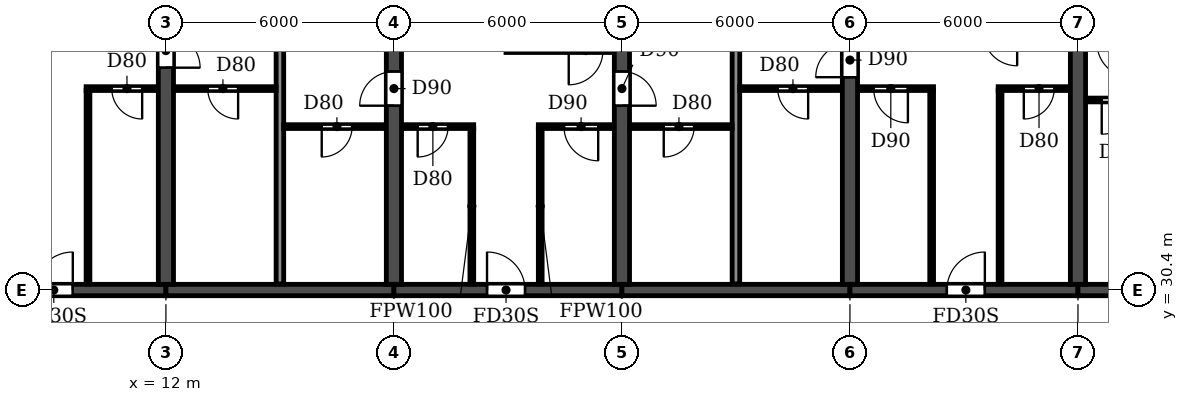
"""IFC4 building model, lengths in metres.
Left out: names, types, materials, properties, quantities, classifications, styles, units other than length and angle.
Written with IfcOpenShell. Run it as: python <this file> out.ifc"""

import sys

from ifc_helpers import new_model, si_unit, direction, frame, frame_2d, origin, place, context, subcontext, project, spatial, rectangle, extrude, element, fill, save


model = new_model("IFC4")
c1 = context("Model", 3, precision=1e-05, world=origin(), true_north=direction((0.0, 1.0)))
c2 = subcontext(c1, "Body", "Model", "MODEL_VIEW")
j1 = project(units=[si_unit("LENGTHUNIT", "METRE"), si_unit("PLANEANGLEUNIT", "RADIAN")], contexts=[c1])
p1 = place(None, origin())
s1 = spatial("IfcSite", under=j1, at=p1, CompositionType="ELEMENT")
p2 = place(p1, origin())
s2 = spatial("IfcBuilding", under=s1, at=p2, CompositionType="ELEMENT")
p3 = place(p2, frame((0.0, 0.0, 26.7)))
s3 = spatial("IfcBuildingStorey", under=s2, at=p3, CompositionType="ELEMENT", Elevation=26.7)
p4 = place(p3, frame((12.0, 30.55, 0.0), z_axis=(0.0, 0.0, 1.0), x_axis=(0.0, 1.0, 0.0)))
e1 = element("IfcWall", 1, at=p4, inside=s3, PredefinedType="SHEAR", context=c2, shape_type="SweptSolid", body=[
    extrude(rectangle(XDim=14.05, YDim=0.4, at=frame_2d((7.025, 0.0))), origin(), (0.0, 0.0, 1.0), 3.05),
])
p5 = place(p4, frame((5.7, 0.0, 0.0)))
e2 = element("IfcOpeningElement", 2, at=p5, cuts=e1, PredefinedType="OPENING", context=c2, shape_type="SweptSolid", body=[
    extrude(rectangle(XDim=0.9, YDim=2.1, at=frame_2d((0.45, 1.05))), frame((0.0, 0.21, 0.0), z_axis=(0.0, -1.0, 0.0), x_axis=(1.0, 0.0, 0.0)), (0.0, 0.0, 1.0), 0.42),
])
p6 = place(p3, frame((18.0, 30.55, 0.0), z_axis=(0.0, 0.0, 1.0), x_axis=(0.0, 1.0, 0.0)))
e3 = element("IfcWall", 3, at=p6, inside=s3, PredefinedType="SHEAR", context=c2, shape_type="SweptSolid", body=[
    extrude(rectangle(XDim=14.05, YDim=0.4, at=frame_2d((7.025, 0.0))), origin(), (0.0, 0.0, 1.0), 3.05),
])
p7 = place(p6, frame((4.7, 0.0, 0.0)))
e4 = element("IfcOpeningElement", 4, at=p7, cuts=e3, PredefinedType="OPENING", context=c2, shape_type="SweptSolid", body=[
    extrude(rectangle(XDim=0.9, YDim=2.1, at=frame_2d((0.45, 1.05))), frame((0.0, 0.21, 0.0), z_axis=(0.0, -1.0, 0.0), x_axis=(1.0, 0.0, 0.0)), (0.0, 0.0, 1.0), 0.42),
])
p8 = place(p3, frame((24.0, 30.55, 0.0), z_axis=(0.0, 0.0, 1.0), x_axis=(0.0, 1.0, 0.0)))
e5 = element("IfcWall", 5, at=p8, inside=s3, PredefinedType="SHEAR", context=c2, shape_type="SweptSolid", body=[
    extrude(rectangle(XDim=14.05, YDim=0.4, at=frame_2d((7.025, 0.0))), origin(), (0.0, 0.0, 1.0), 3.05),
])
p9 = place(p8, frame((4.7, 0.0, 0.0)))
e6 = element("IfcOpeningElement", 6, at=p9, cuts=e5, PredefinedType="OPENING", context=c2, shape_type="SweptSolid", body=[
    extrude(rectangle(XDim=0.9, YDim=2.1, at=frame_2d((0.45, 1.05))), frame((0.0, 0.21, 0.0), z_axis=(0.0, -1.0, 0.0), x_axis=(1.0, 0.0, 0.0)), (0.0, 0.0, 1.0), 0.42),
])
p10 = place(p3, frame((30.0, 30.55, 0.0), z_axis=(0.0, 0.0, 1.0), x_axis=(0.0, 1.0, 0.0)))
e7 = element("IfcWall", 7, at=p10, inside=s3, PredefinedType="SHEAR", context=c2, shape_type="SweptSolid", body=[
    extrude(rectangle(XDim=14.05, YDim=0.4, at=frame_2d((7.025, 0.0))), origin(), (0.0, 0.0, 1.0), 3.05),
])
p11 = place(p10, frame((5.45, 0.0, 0.0)))
e8 = element("IfcOpeningElement", 8, at=p11, cuts=e7, PredefinedType="OPENING", context=c2, shape_type="SweptSolid", body=[
    extrude(rectangle(XDim=0.9, YDim=2.1, at=frame_2d((0.45, 1.05))), frame((0.0, 0.21, 0.0), z_axis=(0.0, -1.0, 0.0), x_axis=(1.0, 0.0, 0.0)), (0.0, 0.0, 1.0), 0.42),
])
p12 = place(p3, frame((36.0, 30.55, 0.0), z_axis=(0.0, 0.0, 1.0), x_axis=(0.0, 1.0, 0.0)))
e9 = element("IfcWall", 9, at=p12, inside=s3, PredefinedType="SHEAR", context=c2, shape_type="SweptSolid", body=[
    extrude(rectangle(XDim=14.05, YDim=0.4, at=frame_2d((7.025, 0.0))), origin(), (0.0, 0.0, 1.0), 3.05),
])
p13 = place(p3, frame((6.0, 30.4, 0.0), z_axis=(0.0, 0.0, 1.0), x_axis=(1.0, 0.0, 0.0)))
e10 = element("IfcWall", 10, at=p13, inside=s3, PredefinedType="SHEAR", context=c2, shape_type="SweptSolid", body=[
    extrude(rectangle(XDim=6.0, YDim=0.3, at=frame_2d((3.0, 0.0))), origin(), (0.0, 0.0, 1.0), 2.45),
])
p14 = place(p13, frame((2.55, 0.0, 0.0)))
e11 = element("IfcOpeningElement", 11, at=p14, cuts=e10, PredefinedType="OPENING", context=c2, shape_type="SweptSolid", body=[
    extrude(rectangle(XDim=1.0, YDim=2.1, at=frame_2d((0.5, 1.05))), frame((0.0, 0.16, 0.0), z_axis=(0.0, -1.0, 0.0), x_axis=(1.0, 0.0, 0.0)), (0.0, 0.0, 1.0), 0.32),
])
p15 = place(p3, frame((12.0, 30.4, 0.0), z_axis=(0.0, 0.0, 1.0), x_axis=(1.0, 0.0, 0.0)))
e12 = element("IfcWall", 12, at=p15, inside=s3, PredefinedType="SHEAR", context=c2, shape_type="SweptSolid", body=[
    extrude(rectangle(XDim=6.0, YDim=0.3, at=frame_2d((3.0, 0.0))), origin(), (0.0, 0.0, 1.0), 2.45),
])
p16 = place(p3, frame((18.0, 30.4, 0.0), z_axis=(0.0, 0.0, 1.0), x_axis=(1.0, 0.0, 0.0)))
e13 = element("IfcWall", 13, at=p16, inside=s3, PredefinedType="SHEAR", context=c2, shape_type="SweptSolid", body=[
    extrude(rectangle(XDim=6.0, YDim=0.3, at=frame_2d((3.0, 0.0))), origin(), (0.0, 0.0, 1.0), 2.45),
])
p17 = place(p16, frame((2.45, 0.0, 0.0)))
e14 = element("IfcOpeningElement", 14, at=p17, cuts=e13, PredefinedType="OPENING", context=c2, shape_type="SweptSolid", body=[
    extrude(rectangle(XDim=1.0, YDim=2.1, at=frame_2d((0.5, 1.05))), frame((0.0, 0.16, 0.0), z_axis=(0.0, -1.0, 0.0), x_axis=(1.0, 0.0, 0.0)), (0.0, 0.0, 1.0), 0.32),
])
p18 = place(p3, frame((24.0, 30.4, 0.0), z_axis=(0.0, 0.0, 1.0), x_axis=(1.0, 0.0, 0.0)))
e15 = element("IfcWall", 15, at=p18, inside=s3, PredefinedType="SHEAR", context=c2, shape_type="SweptSolid", body=[
    extrude(rectangle(XDim=6.0, YDim=0.3, at=frame_2d((3.0, 0.0))), origin(), (0.0, 0.0, 1.0), 2.45),
])
p19 = place(p3, frame((30.0, 30.4, 0.0), z_axis=(0.0, 0.0, 1.0), x_axis=(1.0, 0.0, 0.0)))
e16 = element("IfcWall", 16, at=p19, inside=s3, PredefinedType="SHEAR", context=c2, shape_type="SweptSolid", body=[
    extrude(rectangle(XDim=6.0, YDim=0.3, at=frame_2d((3.0, 0.0))), origin(), (0.0, 0.0, 1.0), 2.45),
])
p20 = place(p19, frame((2.55, 0.0, 0.0)))
e17 = element("IfcOpeningElement", 17, at=p20, cuts=e16, PredefinedType="OPENING", context=c2, shape_type="SweptSolid", body=[
    extrude(rectangle(XDim=1.0, YDim=2.1, at=frame_2d((0.5, 1.05))), frame((0.0, 0.16, 0.0), z_axis=(0.0, -1.0, 0.0), x_axis=(1.0, 0.0, 0.0)), (0.0, 0.0, 1.0), 0.32),
])
p21 = place(p3, frame((36.0, 30.4, 0.0), z_axis=(0.0, 0.0, 1.0), x_axis=(1.0, 0.0, 0.0)))
e18 = element("IfcWall", 18, at=p21, inside=s3, PredefinedType="SHEAR", context=c2, shape_type="SweptSolid", body=[
    extrude(rectangle(XDim=6.0, YDim=0.3, at=frame_2d((3.0, 0.0))), origin(), (0.0, 0.0, 1.0), 2.45),
])
p22 = place(p21, frame((2.55, 0.0, 0.0)))
e19 = element("IfcOpeningElement", 19, at=p22, cuts=e18, PredefinedType="OPENING", context=c2, shape_type="SweptSolid", body=[
    extrude(rectangle(XDim=1.0, YDim=2.1, at=frame_2d((0.5, 1.05))), frame((0.0, 0.16, 0.0), z_axis=(0.0, -1.0, 0.0), x_axis=(1.0, 0.0, 0.0)), (0.0, 0.0, 1.0), 0.32),
])
for number, where, z_axis, x_axis in (
    (20, (15.0, 30.56, 0.0), (0.0, 0.0, 1.0), (0.0, 1.0, 0.0)),
    (21, (27.0, 30.56, 0.0), (0.0, 0.0, 1.0), (0.0, 1.0, 0.0)),
):
    element("IfcWall", number, at=place(p3, frame(where, z_axis=z_axis, x_axis=x_axis)), inside=s3, PredefinedType="PARTITIONING", context=c2, shape_type="SweptSolid", body=[
        extrude(rectangle(XDim=14.18, YDim=0.2, at=frame_2d((7.09, 0.0))), origin(), (0.0, 0.0, 1.0), 3.05),
    ])
p23 = place(p3, frame((15.1, 34.7, 0.0), z_axis=(0.0, 0.0, 1.0), x_axis=(1.0, 0.0, 0.0)))
e22 = element("IfcWall", 22, at=p23, inside=s3, PredefinedType="PARTITIONING", context=c2, shape_type="SweptSolid", body=[
    extrude(rectangle(XDim=2.69, YDim=0.1, at=frame_2d((1.345, 0.0))), origin(), (0.0, 0.0, 1.0), 3.05),
])
p24 = place(p23, frame((1.0, 0.0, 0.0)))
e23 = element("IfcOpeningElement", 23, at=p24, cuts=e22, PredefinedType="OPENING", context=c2, shape_type="SweptSolid", body=[
    extrude(rectangle(XDim=0.8, YDim=2.1, at=frame_2d((0.4, 1.05))), frame((0.0, 0.06, 0.0), z_axis=(0.0, -1.0, 0.0), x_axis=(1.0, 0.0, 0.0)), (0.0, 0.0, 1.0), 0.12),
])
p25 = place(p3, frame((18.21, 34.7, 0.0), z_axis=(0.0, 0.0, 1.0), x_axis=(1.0, 0.0, 0.0)))
e24 = element("IfcWall", 24, at=p25, inside=s3, PredefinedType="PARTITIONING", context=c2, shape_type="SweptSolid", body=[
    extrude(rectangle(XDim=1.89, YDim=0.1, at=frame_2d((0.945, 0.0))), origin(), (0.0, 0.0, 1.0), 3.05),
])
p26 = place(p25, frame((0.415, 0.0, 0.0)))
e25 = element("IfcOpeningElement", 25, at=p26, cuts=e24, PredefinedType="OPENING", context=c2, shape_type="SweptSolid", body=[
    extrude(rectangle(XDim=0.8, YDim=2.1, at=frame_2d((0.4, 1.05))), frame((0.0, 0.06, 0.0), z_axis=(0.0, -1.0, 0.0), x_axis=(1.0, 0.0, 0.0)), (0.0, 0.0, 1.0), 0.12),
])
p27 = place(p3, frame((21.8, 34.7, 0.0), z_axis=(0.0, 0.0, 1.0), x_axis=(1.0, 0.0, 0.0)))
e26 = element("IfcWall", 26, at=p27, inside=s3, PredefinedType="PARTITIONING", context=c2, shape_type="SweptSolid", body=[
    extrude(rectangle(XDim=1.99, YDim=0.1, at=frame_2d((0.995, 0.0))), origin(), (0.0, 0.0, 1.0), 3.05),
])
p28 = place(p27, frame((0.675, 0.0, 0.0)))
e27 = element("IfcOpeningElement", 27, at=p28, cuts=e26, PredefinedType="OPENING", context=c2, shape_type="SweptSolid", body=[
    extrude(rectangle(XDim=0.9, YDim=2.1, at=frame_2d((0.45, 1.05))), frame((0.0, 0.06, 0.0), z_axis=(0.0, -1.0, 0.0), x_axis=(1.0, 0.0, 0.0)), (0.0, 0.0, 1.0), 0.12),
])
p29 = place(p3, frame((24.21, 34.7, 0.0), z_axis=(0.0, 0.0, 1.0), x_axis=(1.0, 0.0, 0.0)))
e28 = element("IfcWall", 28, at=p29, inside=s3, PredefinedType="PARTITIONING", context=c2, shape_type="SweptSolid", body=[
    extrude(rectangle(XDim=2.69, YDim=0.1, at=frame_2d((1.345, 0.0))), origin(), (0.0, 0.0, 1.0), 3.05),
])
p30 = place(p29, frame((0.89, 0.0, 0.0)))
e29 = element("IfcOpeningElement", 29, at=p30, cuts=e28, PredefinedType="OPENING", context=c2, shape_type="SweptSolid", body=[
    extrude(rectangle(XDim=0.8, YDim=2.1, at=frame_2d((0.4, 1.05))), frame((0.0, 0.06, 0.0), z_axis=(0.0, -1.0, 0.0), x_axis=(1.0, 0.0, 0.0)), (0.0, 0.0, 1.0), 0.12),
])
p31 = place(p3, frame((36.21, 35.4, 0.0), z_axis=(0.0, 0.0, 1.0), x_axis=(1.0, 0.0, 0.0)))
e30 = element("IfcWall", 30, at=p31, inside=s3, PredefinedType="PARTITIONING", context=c2, shape_type="SweptSolid", body=[
    extrude(rectangle(XDim=1.99, YDim=0.1, at=frame_2d((0.995, 0.0))), origin(), (0.0, 0.0, 1.0), 3.05),
])
p32 = place(p31, frame((0.415, 0.0, 0.0)))
e31 = element("IfcOpeningElement", 31, at=p32, cuts=e30, PredefinedType="OPENING", context=c2, shape_type="SweptSolid", body=[
    extrude(rectangle(XDim=0.9, YDim=2.1, at=frame_2d((0.45, 1.05))), frame((0.0, 0.06, 0.0), z_axis=(0.0, -1.0, 0.0), x_axis=(1.0, 0.0, 0.0)), (0.0, 0.0, 1.0), 0.12),
])
p33 = place(p3, frame((9.9, 35.7, 0.0), z_axis=(0.0, 0.0, 1.0), x_axis=(1.0, 0.0, 0.0)))
e32 = element("IfcWall", 32, at=p33, inside=s3, PredefinedType="PARTITIONING", context=c2, shape_type="SweptSolid", body=[
    extrude(rectangle(XDim=1.89, YDim=0.1, at=frame_2d((0.945, 0.0))), origin(), (0.0, 0.0, 1.0), 3.05),
])
p34 = place(p33, frame((0.675, 0.0, 0.0)))
e33 = element("IfcOpeningElement", 33, at=p34, cuts=e32, PredefinedType="OPENING", context=c2, shape_type="SweptSolid", body=[
    extrude(rectangle(XDim=0.8, YDim=2.1, at=frame_2d((0.4, 1.05))), frame((0.0, 0.06, 0.0), z_axis=(0.0, -1.0, 0.0), x_axis=(1.0, 0.0, 0.0)), (0.0, 0.0, 1.0), 0.12),
])
p35 = place(p3, frame((12.21, 35.7, 0.0), z_axis=(0.0, 0.0, 1.0), x_axis=(1.0, 0.0, 0.0)))
e34 = element("IfcWall", 34, at=p35, inside=s3, PredefinedType="PARTITIONING", context=c2, shape_type="SweptSolid", body=[
    extrude(rectangle(XDim=2.69, YDim=0.1, at=frame_2d((1.345, 0.0))), origin(), (0.0, 0.0, 1.0), 3.05),
])
p36 = place(p35, frame((0.89, 0.0, 0.0)))
e35 = element("IfcOpeningElement", 35, at=p36, cuts=e34, PredefinedType="OPENING", context=c2, shape_type="SweptSolid", body=[
    extrude(rectangle(XDim=0.8, YDim=2.1, at=frame_2d((0.4, 1.05))), frame((0.0, 0.06, 0.0), z_axis=(0.0, -1.0, 0.0), x_axis=(1.0, 0.0, 0.0)), (0.0, 0.0, 1.0), 0.12),
])
p37 = place(p3, frame((27.1, 35.7, 0.0), z_axis=(0.0, 0.0, 1.0), x_axis=(1.0, 0.0, 0.0)))
e36 = element("IfcWall", 36, at=p37, inside=s3, PredefinedType="PARTITIONING", context=c2, shape_type="SweptSolid", body=[
    extrude(rectangle(XDim=2.69, YDim=0.1, at=frame_2d((1.345, 0.0))), origin(), (0.0, 0.0, 1.0), 3.05),
])
p38 = place(p37, frame((1.0, 0.0, 0.0)))
e37 = element("IfcOpeningElement", 37, at=p38, cuts=e36, PredefinedType="OPENING", context=c2, shape_type="SweptSolid", body=[
    extrude(rectangle(XDim=0.8, YDim=2.1, at=frame_2d((0.4, 1.05))), frame((0.0, 0.06, 0.0), z_axis=(0.0, -1.0, 0.0), x_axis=(1.0, 0.0, 0.0)), (0.0, 0.0, 1.0), 0.12),
])
p39 = place(p3, frame((30.21, 35.7, 0.0), z_axis=(0.0, 0.0, 1.0), x_axis=(1.0, 0.0, 0.0)))
e38 = element("IfcWall", 38, at=p39, inside=s3, PredefinedType="PARTITIONING", context=c2, shape_type="SweptSolid", body=[
    extrude(rectangle(XDim=1.99, YDim=0.1, at=frame_2d((0.995, 0.0))), origin(), (0.0, 0.0, 1.0), 3.05),
])
p40 = place(p39, frame((0.415, 0.0, 0.0)))
e39 = element("IfcOpeningElement", 39, at=p40, cuts=e38, PredefinedType="OPENING", context=c2, shape_type="SweptSolid", body=[
    extrude(rectangle(XDim=0.9, YDim=2.1, at=frame_2d((0.45, 1.05))), frame((0.0, 0.06, 0.0), z_axis=(0.0, -1.0, 0.0), x_axis=(1.0, 0.0, 0.0)), (0.0, 0.0, 1.0), 0.12),
])
p41 = place(p3, frame((33.9, 35.7, 0.0), z_axis=(0.0, 0.0, 1.0), x_axis=(1.0, 0.0, 0.0)))
e40 = element("IfcWall", 40, at=p41, inside=s3, PredefinedType="PARTITIONING", context=c2, shape_type="SweptSolid", body=[
    extrude(rectangle(XDim=1.89, YDim=0.1, at=frame_2d((0.945, 0.0))), origin(), (0.0, 0.0, 1.0), 3.05),
])
p42 = place(p41, frame((0.675, 0.0, 0.0)))
e41 = element("IfcOpeningElement", 41, at=p42, cuts=e40, PredefinedType="OPENING", context=c2, shape_type="SweptSolid", body=[
    extrude(rectangle(XDim=0.8, YDim=2.1, at=frame_2d((0.4, 1.05))), frame((0.0, 0.06, 0.0), z_axis=(0.0, -1.0, 0.0), x_axis=(1.0, 0.0, 0.0)), (0.0, 0.0, 1.0), 0.12),
])
p43 = place(p3, frame((9.95, 30.56, 0.0), z_axis=(0.0, 0.0, 1.0), x_axis=(0.0, 1.0, 0.0)))
e42 = element("IfcWall", 42, at=p43, inside=s3, PredefinedType="PARTITIONING", context=c2, shape_type="SweptSolid", body=[
    extrude(rectangle(XDim=5.09, YDim=0.1, at=frame_2d((2.545, 0.0))), origin(), (0.0, 0.0, 1.0), 3.05),
])
for number, where, z_axis, x_axis in (
    (43, (20.05, 30.56, 0.0), (0.0, 0.0, 1.0), (0.0, 1.0, 0.0)),
    (44, (21.85, 30.56, 0.0), (0.0, 0.0, 1.0), (0.0, 1.0, 0.0)),
):
    element("IfcWall", number, at=place(p3, frame(where, z_axis=z_axis, x_axis=x_axis)), inside=s3, PredefinedType="PARTITIONING", context=c2, shape_type="SweptSolid", body=[
        extrude(rectangle(XDim=4.09, YDim=0.1, at=frame_2d((2.045, 0.0))), origin(), (0.0, 0.0, 1.0), 3.05),
    ])
for number, where, z_axis, x_axis in (
    (45, (32.15, 30.56, 0.0), (0.0, 0.0, 1.0), (0.0, 1.0, 0.0)),
    (46, (33.95, 30.56, 0.0), (0.0, 0.0, 1.0), (0.0, 1.0, 0.0)),
):
    element("IfcWall", number, at=place(p3, frame(where, z_axis=z_axis, x_axis=x_axis)), inside=s3, PredefinedType="PARTITIONING", context=c2, shape_type="SweptSolid", body=[
        extrude(rectangle(XDim=5.09, YDim=0.1, at=frame_2d((2.545, 0.0))), origin(), (0.0, 0.0, 1.0), 3.05),
    ])
p44 = place(p36, frame((0.8, 0.0, 0.0), z_axis=(0.0, 0.0, 1.0), x_axis=(-1.0, 0.0, 0.0)))
e47 = element("IfcDoor", 47, at=p44, inside=s3, OperationType="SINGLE_SWING_LEFT", PredefinedType="DOOR", context=c2, shape_type="SweptSolid", body=[
    extrude(rectangle(XDim=0.8, YDim=2.1, at=frame_2d((0.4, 1.05))), frame((0.0, 0.025, 0.0), z_axis=(0.0, -1.0, 0.0), x_axis=(1.0, 0.0, 0.0)), (0.0, 0.0, 1.0), 0.05),
])
fill(e35, e47)
p45 = place(p14, origin())
e48 = element("IfcDoor", 48, at=p45, inside=s3, OperationType="SINGLE_SWING_RIGHT", PredefinedType="DOOR", context=c2, shape_type="SweptSolid", body=[
    extrude(rectangle(XDim=1.0, YDim=2.1, at=frame_2d((0.5, 1.05))), frame((0.0, 0.025, 0.0), z_axis=(0.0, -1.0, 0.0), x_axis=(1.0, 0.0, 0.0)), (0.0, 0.0, 1.0), 0.05),
])
fill(e11, e48)
p46 = place(p34, frame((0.8, 0.0, 0.0), z_axis=(0.0, 0.0, 1.0), x_axis=(-1.0, 0.0, 0.0)))
e49 = element("IfcDoor", 49, at=p46, inside=s3, OperationType="SINGLE_SWING_LEFT", PredefinedType="DOOR", context=c2, shape_type="SweptSolid", body=[
    extrude(rectangle(XDim=0.8, YDim=2.1, at=frame_2d((0.4, 1.05))), frame((0.0, 0.025, 0.0), z_axis=(0.0, -1.0, 0.0), x_axis=(1.0, 0.0, 0.0)), (0.0, 0.0, 1.0), 0.05),
])
fill(e33, e49)
p47 = place(p5, frame((0.9, 0.0, 0.0), z_axis=(0.0, 0.0, 1.0), x_axis=(-1.0, 0.0, 0.0)))
e50 = element("IfcDoor", 50, at=p47, inside=s3, OperationType="SINGLE_SWING_RIGHT", PredefinedType="DOOR", context=c2, shape_type="SweptSolid", body=[
    extrude(rectangle(XDim=0.9, YDim=2.1, at=frame_2d((0.45, 1.05))), frame((0.0, 0.025, 0.0), z_axis=(0.0, -1.0, 0.0), x_axis=(1.0, 0.0, 0.0)), (0.0, 0.0, 1.0), 0.05),
])
fill(e2, e50)
p48 = place(p24, frame((0.8, 0.0, 0.0), z_axis=(0.0, 0.0, 1.0), x_axis=(-1.0, 0.0, 0.0)))
e51 = element("IfcDoor", 51, at=p48, inside=s3, OperationType="SINGLE_SWING_RIGHT", PredefinedType="DOOR", context=c2, shape_type="SweptSolid", body=[
    extrude(rectangle(XDim=0.8, YDim=2.1, at=frame_2d((0.4, 1.05))), frame((0.0, 0.025, 0.0), z_axis=(0.0, -1.0, 0.0), x_axis=(1.0, 0.0, 0.0)), (0.0, 0.0, 1.0), 0.05),
])
fill(e23, e51)
p49 = place(p30, frame((0.8, 0.0, 0.0), z_axis=(0.0, 0.0, 1.0), x_axis=(-1.0, 0.0, 0.0)))
e52 = element("IfcDoor", 52, at=p49, inside=s3, OperationType="SINGLE_SWING_RIGHT", PredefinedType="DOOR", context=c2, shape_type="SweptSolid", body=[
    extrude(rectangle(XDim=0.8, YDim=2.1, at=frame_2d((0.4, 1.05))), frame((0.0, 0.025, 0.0), z_axis=(0.0, -1.0, 0.0), x_axis=(1.0, 0.0, 0.0)), (0.0, 0.0, 1.0), 0.05),
])
fill(e29, e52)
p50 = place(p7, origin())
e53 = element("IfcDoor", 53, at=p50, inside=s3, OperationType="SINGLE_SWING_LEFT", PredefinedType="DOOR", context=c2, shape_type="SweptSolid", body=[
    extrude(rectangle(XDim=0.9, YDim=2.1, at=frame_2d((0.45, 1.05))), frame((0.0, 0.025, 0.0), z_axis=(0.0, -1.0, 0.0), x_axis=(1.0, 0.0, 0.0)), (0.0, 0.0, 1.0), 0.05),
])
fill(e4, e53)
p51 = place(p26, frame((0.8, 0.0, 0.0), z_axis=(0.0, 0.0, 1.0), x_axis=(-1.0, 0.0, 0.0)))
e54 = element("IfcDoor", 54, at=p51, inside=s3, OperationType="SINGLE_SWING_RIGHT", PredefinedType="DOOR", context=c2, shape_type="SweptSolid", body=[
    extrude(rectangle(XDim=0.8, YDim=2.1, at=frame_2d((0.4, 1.05))), frame((0.0, 0.025, 0.0), z_axis=(0.0, -1.0, 0.0), x_axis=(1.0, 0.0, 0.0)), (0.0, 0.0, 1.0), 0.05),
])
fill(e25, e54)
p52 = place(p17, origin())
e55 = element("IfcDoor", 55, at=p52, inside=s3, OperationType="SINGLE_SWING_LEFT", PredefinedType="DOOR", context=c2, shape_type="SweptSolid", body=[
    extrude(rectangle(XDim=1.0, YDim=2.1, at=frame_2d((0.5, 1.05))), frame((0.0, 0.025, 0.0), z_axis=(0.0, -1.0, 0.0), x_axis=(1.0, 0.0, 0.0)), (0.0, 0.0, 1.0), 0.05),
])
fill(e14, e55)
p53 = place(p28, frame((0.9, 0.0, 0.0), z_axis=(0.0, 0.0, 1.0), x_axis=(-1.0, 0.0, 0.0)))
e56 = element("IfcDoor", 56, at=p53, inside=s3, OperationType="SINGLE_SWING_LEFT", PredefinedType="DOOR", context=c2, shape_type="SweptSolid", body=[
    extrude(rectangle(XDim=0.9, YDim=2.1, at=frame_2d((0.45, 1.05))), frame((0.0, 0.025, 0.0), z_axis=(0.0, -1.0, 0.0), x_axis=(1.0, 0.0, 0.0)), (0.0, 0.0, 1.0), 0.05),
])
fill(e27, e56)
p54 = place(p9, frame((0.9, 0.0, 0.0), z_axis=(0.0, 0.0, 1.0), x_axis=(-1.0, 0.0, 0.0)))
e57 = element("IfcDoor", 57, at=p54, inside=s3, OperationType="SINGLE_SWING_RIGHT", PredefinedType="DOOR", context=c2, shape_type="SweptSolid", body=[
    extrude(rectangle(XDim=0.9, YDim=2.1, at=frame_2d((0.45, 1.05))), frame((0.0, 0.025, 0.0), z_axis=(0.0, -1.0, 0.0), x_axis=(1.0, 0.0, 0.0)), (0.0, 0.0, 1.0), 0.05),
])
fill(e6, e57)
p55 = place(p38, frame((0.8, 0.0, 0.0), z_axis=(0.0, 0.0, 1.0), x_axis=(-1.0, 0.0, 0.0)))
e58 = element("IfcDoor", 58, at=p55, inside=s3, OperationType="SINGLE_SWING_LEFT", PredefinedType="DOOR", context=c2, shape_type="SweptSolid", body=[
    extrude(rectangle(XDim=0.8, YDim=2.1, at=frame_2d((0.4, 1.05))), frame((0.0, 0.025, 0.0), z_axis=(0.0, -1.0, 0.0), x_axis=(1.0, 0.0, 0.0)), (0.0, 0.0, 1.0), 0.05),
])
fill(e37, e58)
p56 = place(p11, origin())
e59 = element("IfcDoor", 59, at=p56, inside=s3, OperationType="SINGLE_SWING_LEFT", PredefinedType="DOOR", context=c2, shape_type="SweptSolid", body=[
    extrude(rectangle(XDim=0.9, YDim=2.1, at=frame_2d((0.45, 1.05))), frame((0.0, 0.025, 0.0), z_axis=(0.0, -1.0, 0.0), x_axis=(1.0, 0.0, 0.0)), (0.0, 0.0, 1.0), 0.05),
])
fill(e8, e59)
p57 = place(p40, frame((0.9, 0.0, 0.0), z_axis=(0.0, 0.0, 1.0), x_axis=(-1.0, 0.0, 0.0)))
e60 = element("IfcDoor", 60, at=p57, inside=s3, OperationType="SINGLE_SWING_LEFT", PredefinedType="DOOR", context=c2, shape_type="SweptSolid", body=[
    extrude(rectangle(XDim=0.9, YDim=2.1, at=frame_2d((0.45, 1.05))), frame((0.0, 0.025, 0.0), z_axis=(0.0, -1.0, 0.0), x_axis=(1.0, 0.0, 0.0)), (0.0, 0.0, 1.0), 0.05),
])
fill(e39, e60)
p58 = place(p20, origin())
e61 = element("IfcDoor", 61, at=p58, inside=s3, OperationType="SINGLE_SWING_RIGHT", PredefinedType="DOOR", context=c2, shape_type="SweptSolid", body=[
    extrude(rectangle(XDim=1.0, YDim=2.1, at=frame_2d((0.5, 1.05))), frame((0.0, 0.025, 0.0), z_axis=(0.0, -1.0, 0.0), x_axis=(1.0, 0.0, 0.0)), (0.0, 0.0, 1.0), 0.05),
])
fill(e17, e61)
p59 = place(p42, frame((0.8, 0.0, 0.0), z_axis=(0.0, 0.0, 1.0), x_axis=(-1.0, 0.0, 0.0)))
e62 = element("IfcDoor", 62, at=p59, inside=s3, OperationType="SINGLE_SWING_RIGHT", PredefinedType="DOOR", context=c2, shape_type="SweptSolid", body=[
    extrude(rectangle(XDim=0.8, YDim=2.1, at=frame_2d((0.4, 1.05))), frame((0.0, 0.025, 0.0), z_axis=(0.0, -1.0, 0.0), x_axis=(1.0, 0.0, 0.0)), (0.0, 0.0, 1.0), 0.05),
])
fill(e41, e62)
p60 = place(p32, frame((0.9, 0.0, 0.0), z_axis=(0.0, 0.0, 1.0), x_axis=(-1.0, 0.0, 0.0)))
e63 = element("IfcDoor", 63, at=p60, inside=s3, OperationType="SINGLE_SWING_RIGHT", PredefinedType="DOOR", context=c2, shape_type="SweptSolid", body=[
    extrude(rectangle(XDim=0.9, YDim=2.1, at=frame_2d((0.45, 1.05))), frame((0.0, 0.025, 0.0), z_axis=(0.0, -1.0, 0.0), x_axis=(1.0, 0.0, 0.0)), (0.0, 0.0, 1.0), 0.05),
])
fill(e31, e63)
save(model, sys.argv[1])
